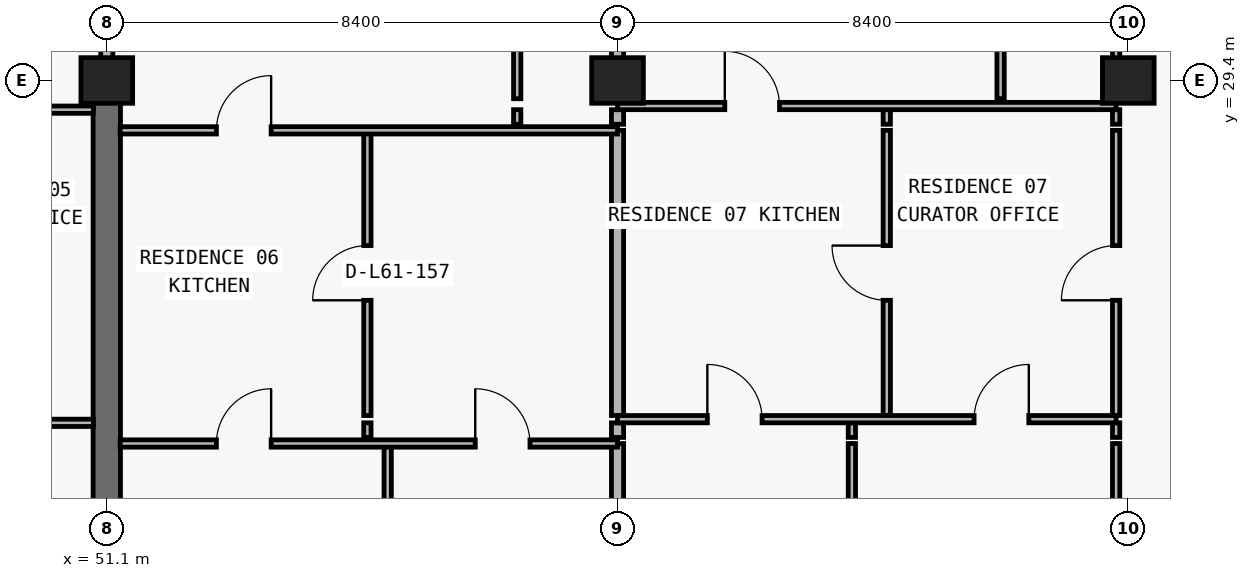
"""IFC4 building model, lengths in metres.
Left out: names, types, materials, properties, quantities, classifications, styles, units other than length and angle.
Written with IfcOpenShell. Run it as: python <this file> out.ifc"""

import sys

from ifc_helpers import new_model, si_unit, direction, frame, frame_2d, origin, origin_2d, place, context, subcontext, project, spatial, rectangle, extrude, element, fill, save


model = new_model("IFC4")
c1 = context("Model", 3, precision=1e-05, world=origin(), true_north=direction((0.0, 1.0)))
c2 = subcontext(c1, "Body", "Model", "MODEL_VIEW")
j1 = project(units=[si_unit("LENGTHUNIT", "METRE"), si_unit("PLANEANGLEUNIT", "RADIAN")], contexts=[c1])
p1 = place(None, origin())
s1 = spatial("IfcSite", under=j1, at=p1, CompositionType="ELEMENT")
p2 = place(p1, origin())
s2 = spatial("IfcBuilding", under=s1, at=p2, CompositionType="ELEMENT")
p3 = place(p2, frame((0.0, 0.0, 218.1)))
s3 = spatial("IfcBuildingStorey", under=s2, at=p3, CompositionType="ELEMENT", Elevation=218.1)
for number, where, z_axis, x_axis in (
    (1, (51.1, 29.4, 0.0), (0.0, 0.0, 1.0), (1.0, 0.0, 0.0)),
    (2, (59.5, 29.4, 0.0), (0.0, 0.0, 1.0), (1.0, 0.0, 0.0)),
    (3, (67.9, 29.4, 0.0), (0.0, 0.0, 1.0), (1.0, 0.0, 0.0)),
):
    element("IfcColumn", number, at=place(p3, frame(where, z_axis=z_axis, x_axis=x_axis)), inside=s3, PredefinedType="COLUMN", context=c2, shape_type="SweptSolid", body=[
        extrude(rectangle(XDim=0.85, YDim=0.75, at=origin_2d()), origin(), (0.0, 0.0, 1.0), 3.0),
    ])
p4 = place(p3, frame((51.1, 20.8, 0.0), z_axis=(0.0, 0.0, 1.0), x_axis=(0.0, 1.0, 0.0)))
e4 = element("IfcWall", 4, at=p4, inside=s3, PredefinedType="SHEAR", context=c2, shape_type="SweptSolid", body=[
    extrude(rectangle(XDim=8.6, YDim=0.45, at=frame_2d((4.3, 0.0))), origin(), (0.0, 0.0, 1.0), 3.0),
])
p5 = place(p3, frame((51.1, 29.405, 0.0), z_axis=(0.0, 0.0, 1.0), x_axis=(0.0, 1.0, 0.0)))
e5 = element("IfcWall", 5, at=p5, inside=s3, PredefinedType="PARTITIONING", context=c2, shape_type="SweptSolid", body=[
    extrude(rectangle(XDim=4.995, YDim=0.2, at=frame_2d((2.498, 0.0))), origin(), (0.0, 0.0, 1.0), 2.285),
])
p6 = place(p3, frame((55.386, 23.53, 0.0), z_axis=(0.0, 0.0, 1.0), x_axis=(0.0, 1.0, 0.0)))
e6 = element("IfcWall", 6, at=p6, inside=s3, PredefinedType="PARTITIONING", context=c2, shape_type="SweptSolid", body=[
    extrude(rectangle(XDim=0.24, YDim=0.12, at=frame_2d((0.12, 0.0))), origin(), (0.0, 0.0, 1.0), 2.449),
])
p7 = place(p3, frame((55.386, 23.89, 0.0), z_axis=(0.0, 0.0, 1.0), x_axis=(0.0, 1.0, 0.0)))
e7 = element("IfcWall", 7, at=p7, inside=s3, PredefinedType="PARTITIONING", context=c2, shape_type="SweptSolid", body=[
    extrude(rectangle(XDim=4.69, YDim=0.12, at=frame_2d((2.345, 0.0))), origin(), (0.0, 0.0, 1.0), 2.449),
])
p8 = place(p7, frame((1.895, 0.0, 0.0)))
e8 = element("IfcOpeningElement", 8, at=p8, cuts=e7, PredefinedType="OPENING", context=c2, shape_type="SweptSolid", body=[
    extrude(rectangle(XDim=0.9, YDim=2.15, at=frame_2d((0.45, 1.075))), frame((0.0, 0.07, 0.0), z_axis=(0.0, -1.0, 0.0), x_axis=(1.0, 0.0, 0.0)), (0.0, 0.0, 1.0), 0.14),
])
p9 = place(p3, frame((55.72, 11.24, 0.0), z_axis=(0.0, 0.0, 1.0), x_axis=(0.0, 1.0, 0.0)))
e9 = element("IfcWall", 9, at=p9, inside=s3, PredefinedType="PARTITIONING", context=c2, shape_type="SweptSolid", body=[
    extrude(rectangle(XDim=12.19, YDim=0.12, at=frame_2d((6.095, 0.0))), origin(), (0.0, 0.0, 1.0), 3.0),
])
p10 = place(p3, frame((57.85, 28.68, 0.0), z_axis=(0.0, 0.0, 1.0), x_axis=(0.0, 1.0, 0.0)))
e10 = element("IfcWall", 10, at=p10, inside=s3, PredefinedType="PARTITIONING", context=c2, shape_type="SweptSolid", body=[
    extrude(rectangle(XDim=0.24, YDim=0.12, at=frame_2d((0.12, 0.0))), origin(), (0.0, 0.0, 1.0), 3.0),
])
p11 = place(p3, frame((57.85, 29.1, 0.0), z_axis=(0.0, 0.0, 1.0), x_axis=(0.0, 1.0, 0.0)))
e11 = element("IfcWall", 11, at=p11, inside=s3, PredefinedType="PARTITIONING", context=c2, shape_type="SweptSolid", body=[
    extrude(rectangle(XDim=5.3, YDim=0.12, at=frame_2d((2.65, 0.0))), origin(), (0.0, 0.0, 1.0), 3.0),
])
p12 = place(p11, frame((2.225, 0.0, 0.0)))
e12 = element("IfcOpeningElement", 12, at=p12, cuts=e11, PredefinedType="OPENING", context=c2, shape_type="SweptSolid", body=[
    extrude(rectangle(XDim=0.85, YDim=2.1, at=frame_2d((0.425, 1.05))), frame((0.0, 0.07, 0.0), z_axis=(0.0, -1.0, 0.0), x_axis=(1.0, 0.0, 0.0)), (0.0, 0.0, 1.0), 0.14),
])
p13 = place(p3, frame((59.5, 11.24, 0.0), z_axis=(0.0, 0.0, 1.0), x_axis=(0.0, 1.0, 0.0)))
e13 = element("IfcWall", 13, at=p13, inside=s3, PredefinedType="PARTITIONING", context=c2, shape_type="SweptSolid", body=[
    extrude(rectangle(XDim=12.19, YDim=0.2, at=frame_2d((6.095, 0.0))), origin(), (0.0, 0.0, 1.0), 2.213),
])
p14 = place(p3, frame((59.5, 23.53, 0.0), z_axis=(0.0, 0.0, 1.0), x_axis=(0.0, 1.0, 0.0)))
e14 = element("IfcWall", 14, at=p14, inside=s3, PredefinedType="PARTITIONING", context=c2, shape_type="SweptSolid", body=[
    extrude(rectangle(XDim=0.24, YDim=0.2, at=frame_2d((0.12, 0.0))), origin(), (0.0, 0.0, 1.0), 2.213),
])
p15 = place(p3, frame((59.5, 23.89, 0.0), z_axis=(0.0, 0.0, 1.0), x_axis=(0.0, 1.0, 0.0)))
e15 = element("IfcWall", 15, at=p15, inside=s3, PredefinedType="PARTITIONING", context=c2, shape_type="SweptSolid", body=[
    extrude(rectangle(XDim=4.69, YDim=0.2, at=frame_2d((2.345, 0.0))), origin(), (0.0, 0.0, 1.0), 2.213),
])
p16 = place(p3, frame((59.5, 28.68, 0.0), z_axis=(0.0, 0.0, 1.0), x_axis=(0.0, 1.0, 0.0)))
e16 = element("IfcWall", 16, at=p16, inside=s3, PredefinedType="PARTITIONING", context=c2, shape_type="SweptSolid", body=[
    extrude(rectangle(XDim=0.24, YDim=0.2, at=frame_2d((0.12, 0.0))), origin(), (0.0, 0.0, 1.0), 2.213),
])
p17 = place(p3, frame((59.5, 29.1, 0.0), z_axis=(0.0, 0.0, 1.0), x_axis=(0.0, 1.0, 0.0)))
e17 = element("IfcWall", 17, at=p17, inside=s3, PredefinedType="PARTITIONING", context=c2, shape_type="SweptSolid", body=[
    extrude(rectangle(XDim=5.3, YDim=0.2, at=frame_2d((2.65, 0.0))), origin(), (0.0, 0.0, 1.0), 2.213),
])
p18 = place(p3, frame((63.354, 11.24, 0.0), z_axis=(0.0, 0.0, 1.0), x_axis=(0.0, 1.0, 0.0)))
e18 = element("IfcWall", 18, at=p18, inside=s3, PredefinedType="PARTITIONING", context=c2, shape_type="SweptSolid", body=[
    extrude(rectangle(XDim=12.19, YDim=0.12, at=frame_2d((6.095, 0.0))), origin(), (0.0, 0.0, 1.0), 3.0),
])
p19 = place(p3, frame((63.354, 23.53, 0.0), z_axis=(0.0, 0.0, 1.0), x_axis=(0.0, 1.0, 0.0)))
e19 = element("IfcWall", 19, at=p19, inside=s3, PredefinedType="PARTITIONING", context=c2, shape_type="SweptSolid", body=[
    extrude(rectangle(XDim=0.24, YDim=0.12, at=frame_2d((0.12, 0.0))), origin(), (0.0, 0.0, 1.0), 3.0),
])
p20 = place(p3, frame((63.928, 23.89, 0.0), z_axis=(0.0, 0.0, 1.0), x_axis=(0.0, 1.0, 0.0)))
e20 = element("IfcWall", 20, at=p20, inside=s3, PredefinedType="PARTITIONING", context=c2, shape_type="SweptSolid", body=[
    extrude(rectangle(XDim=4.69, YDim=0.12, at=frame_2d((2.345, 0.0))), origin(), (0.0, 0.0, 1.0), 2.449),
])
p21 = place(p20, frame((1.895, 0.0, 0.0)))
e21 = element("IfcOpeningElement", 21, at=p21, cuts=e20, PredefinedType="OPENING", context=c2, shape_type="SweptSolid", body=[
    extrude(rectangle(XDim=0.9, YDim=2.15, at=frame_2d((0.45, 1.075))), frame((0.0, 0.07, 0.0), z_axis=(0.0, -1.0, 0.0), x_axis=(1.0, 0.0, 0.0)), (0.0, 0.0, 1.0), 0.14),
])
p22 = place(p3, frame((63.928, 28.68, 0.0), z_axis=(0.0, 0.0, 1.0), x_axis=(0.0, 1.0, 0.0)))
e22 = element("IfcWall", 22, at=p22, inside=s3, PredefinedType="PARTITIONING", context=c2, shape_type="SweptSolid", body=[
    extrude(rectangle(XDim=0.24, YDim=0.12, at=frame_2d((0.12, 0.0))), origin(), (0.0, 0.0, 1.0), 2.449),
])
p23 = place(p3, frame((65.8, 29.1, 0.0), z_axis=(0.0, 0.0, 1.0), x_axis=(0.0, 1.0, 0.0)))
e23 = element("IfcWall", 23, at=p23, inside=s3, PredefinedType="PARTITIONING", context=c2, shape_type="SweptSolid", body=[
    extrude(rectangle(XDim=5.3, YDim=0.12, at=frame_2d((2.65, 0.0))), origin(), (0.0, 0.0, 1.0), 2.675),
])
p24 = place(p23, frame((2.225, 0.0, 0.0)))
e24 = element("IfcOpeningElement", 24, at=p24, cuts=e23, PredefinedType="OPENING", context=c2, shape_type="SweptSolid", body=[
    extrude(rectangle(XDim=0.85, YDim=2.1, at=frame_2d((0.425, 1.05))), frame((0.0, 0.07, 0.0), z_axis=(0.0, -1.0, 0.0), x_axis=(1.0, 0.0, 0.0)), (0.0, 0.0, 1.0), 0.14),
])
p25 = place(p3, frame((67.7, 11.32, 0.0), z_axis=(0.0, 0.0, 1.0), x_axis=(0.0, 1.0, 0.0)))
e25 = element("IfcWall", 25, at=p25, inside=s3, PredefinedType="PARTITIONING", context=c2, shape_type="SweptSolid", body=[
    extrude(rectangle(XDim=12.11, YDim=0.12, at=frame_2d((6.055, 0.0))), origin(), (0.0, 0.0, 1.0), 2.213),
])
p26 = place(p3, frame((67.7, 23.53, 0.0), z_axis=(0.0, 0.0, 1.0), x_axis=(0.0, 1.0, 0.0)))
e26 = element("IfcWall", 26, at=p26, inside=s3, PredefinedType="PARTITIONING", context=c2, shape_type="SweptSolid", body=[
    extrude(rectangle(XDim=0.24, YDim=0.12, at=frame_2d((0.12, 0.0))), origin(), (0.0, 0.0, 1.0), 2.213),
])
p27 = place(p3, frame((67.7, 23.89, 0.0), z_axis=(0.0, 0.0, 1.0), x_axis=(0.0, 1.0, 0.0)))
e27 = element("IfcWall", 27, at=p27, inside=s3, PredefinedType="PARTITIONING", context=c2, shape_type="SweptSolid", body=[
    extrude(rectangle(XDim=4.69, YDim=0.12, at=frame_2d((2.345, 0.0))), origin(), (0.0, 0.0, 1.0), 2.213),
])
p28 = place(p27, frame((1.895, 0.0, 0.0)))
e28 = element("IfcOpeningElement", 28, at=p28, cuts=e27, PredefinedType="OPENING", context=c2, shape_type="SweptSolid", body=[
    extrude(rectangle(XDim=0.9, YDim=2.15, at=frame_2d((0.45, 1.075))), frame((0.0, 0.07, 0.0), z_axis=(0.0, -1.0, 0.0), x_axis=(1.0, 0.0, 0.0)), (0.0, 0.0, 1.0), 0.14),
])
p29 = place(p3, frame((67.7, 28.68, 0.0), z_axis=(0.0, 0.0, 1.0), x_axis=(0.0, 1.0, 0.0)))
e29 = element("IfcWall", 29, at=p29, inside=s3, PredefinedType="PARTITIONING", context=c2, shape_type="SweptSolid", body=[
    extrude(rectangle(XDim=0.24, YDim=0.12, at=frame_2d((0.12, 0.0))), origin(), (0.0, 0.0, 1.0), 2.213),
])
p30 = place(p3, frame((67.7, 29.1, 0.0), z_axis=(0.0, 0.0, 1.0), x_axis=(0.0, 1.0, 0.0)))
e30 = element("IfcWall", 30, at=p30, inside=s3, PredefinedType="PARTITIONING", context=c2, shape_type="SweptSolid", body=[
    extrude(rectangle(XDim=5.3, YDim=0.12, at=frame_2d((2.65, 0.0))), origin(), (0.0, 0.0, 1.0), 2.213),
])
p31 = place(p3, frame((51.32, 23.43, 0.0), z_axis=(0.0, 0.0, 1.0), x_axis=(1.0, 0.0, 0.0)))
e31 = element("IfcWall", 31, at=p31, inside=s3, PredefinedType="PARTITIONING", context=c2, shape_type="SweptSolid", body=[
    extrude(rectangle(XDim=8.18, YDim=0.12, at=frame_2d((4.09, 0.0))), origin(), (0.0, 0.0, 1.0), 3.0),
])
p32 = place(p31, frame((1.583, 0.0, 0.0)))
e32 = element("IfcOpeningElement", 32, at=p32, cuts=e31, PredefinedType="OPENING", context=c2, shape_type="SweptSolid", body=[
    extrude(rectangle(XDim=0.9, YDim=2.15, at=frame_2d((0.45, 1.075))), frame((0.0, 0.07, 0.0), z_axis=(0.0, -1.0, 0.0), x_axis=(1.0, 0.0, 0.0)), (0.0, 0.0, 1.0), 0.14),
])
p33 = place(p31, frame((5.84, 0.0, 0.0)))
e33 = element("IfcOpeningElement", 33, at=p33, cuts=e31, PredefinedType="OPENING", context=c2, shape_type="SweptSolid", body=[
    extrude(rectangle(XDim=0.9, YDim=2.15, at=frame_2d((0.45, 1.075))), frame((0.0, 0.07, 0.0), z_axis=(0.0, -1.0, 0.0), x_axis=(1.0, 0.0, 0.0)), (0.0, 0.0, 1.0), 0.14),
])
p34 = place(p3, frame((42.7, 23.77, 0.0), z_axis=(0.0, 0.0, 1.0), x_axis=(1.0, 0.0, 0.0)))
e34 = element("IfcWall", 34, at=p34, inside=s3, PredefinedType="PARTITIONING", context=c2, shape_type="SweptSolid", body=[
    extrude(rectangle(XDim=8.18, YDim=0.12, at=frame_2d((4.09, 0.0))), origin(), (0.0, 0.0, 1.0), 3.0),
])
p35 = place(p34, frame((1.524, 0.0, 0.0)))
e35 = element("IfcOpeningElement", 35, at=p35, cuts=e34, PredefinedType="OPENING", context=c2, shape_type="SweptSolid", body=[
    extrude(rectangle(XDim=0.9, YDim=2.15, at=frame_2d((0.45, 1.075))), frame((0.0, 0.07, 0.0), z_axis=(0.0, -1.0, 0.0), x_axis=(1.0, 0.0, 0.0)), (0.0, 0.0, 1.0), 0.14),
])
p36 = place(p34, frame((6.033, 0.0, 0.0)))
e36 = element("IfcOpeningElement", 36, at=p36, cuts=e34, PredefinedType="OPENING", context=c2, shape_type="SweptSolid", body=[
    extrude(rectangle(XDim=0.9, YDim=2.15, at=frame_2d((0.45, 1.075))), frame((0.0, 0.07, 0.0), z_axis=(0.0, -1.0, 0.0), x_axis=(1.0, 0.0, 0.0)), (0.0, 0.0, 1.0), 0.14),
])
p37 = place(p3, frame((59.5, 23.83, 0.0), z_axis=(0.0, 0.0, 1.0), x_axis=(1.0, 0.0, 0.0)))
e37 = element("IfcWall", 37, at=p37, inside=s3, PredefinedType="PARTITIONING", context=c2, shape_type="SweptSolid", body=[
    extrude(rectangle(XDim=8.2, YDim=0.12, at=frame_2d((4.1, 0.0))), origin(), (0.0, 0.0, 1.0), 3.0),
])
p38 = place(p37, frame((1.477, 0.0, 0.0)))
e38 = element("IfcOpeningElement", 38, at=p38, cuts=e37, PredefinedType="OPENING", context=c2, shape_type="SweptSolid", body=[
    extrude(rectangle(XDim=0.9, YDim=2.15, at=frame_2d((0.45, 1.075))), frame((0.0, 0.07, 0.0), z_axis=(0.0, -1.0, 0.0), x_axis=(1.0, 0.0, 0.0)), (0.0, 0.0, 1.0), 0.14),
])
p39 = place(p37, frame((5.864, 0.0, 0.0)))
e39 = element("IfcOpeningElement", 39, at=p39, cuts=e37, PredefinedType="OPENING", context=c2, shape_type="SweptSolid", body=[
    extrude(rectangle(XDim=0.9, YDim=2.15, at=frame_2d((0.45, 1.075))), frame((0.0, 0.07, 0.0), z_axis=(0.0, -1.0, 0.0), x_axis=(1.0, 0.0, 0.0)), (0.0, 0.0, 1.0), 0.14),
])
p40 = place(p3, frame((51.32, 28.58, 0.0), z_axis=(0.0, 0.0, 1.0), x_axis=(1.0, 0.0, 0.0)))
e40 = element("IfcWall", 40, at=p40, inside=s3, PredefinedType="PARTITIONING", context=c2, shape_type="SweptSolid", body=[
    extrude(rectangle(XDim=8.18, YDim=0.12, at=frame_2d((4.09, 0.0))), origin(), (0.0, 0.0, 1.0), 3.0),
])
p41 = place(p40, frame((1.583, 0.0, 0.0)))
e41 = element("IfcOpeningElement", 41, at=p41, cuts=e40, PredefinedType="OPENING", context=c2, shape_type="SweptSolid", body=[
    extrude(rectangle(XDim=0.9, YDim=2.15, at=frame_2d((0.45, 1.075))), frame((0.0, 0.07, 0.0), z_axis=(0.0, -1.0, 0.0), x_axis=(1.0, 0.0, 0.0)), (0.0, 0.0, 1.0), 0.14),
])
p42 = place(p3, frame((42.7, 28.92, 0.0), z_axis=(0.0, 0.0, 1.0), x_axis=(1.0, 0.0, 0.0)))
e42 = element("IfcWall", 42, at=p42, inside=s3, PredefinedType="PARTITIONING", context=c2, shape_type="SweptSolid", body=[
    extrude(rectangle(XDim=8.18, YDim=0.12, at=frame_2d((4.09, 0.0))), origin(), (0.0, 0.0, 1.0), 3.0),
])
p43 = place(p42, frame((1.943, 0.0, 0.0)))
e43 = element("IfcOpeningElement", 43, at=p43, cuts=e42, PredefinedType="OPENING", context=c2, shape_type="SweptSolid", body=[
    extrude(rectangle(XDim=0.9, YDim=2.15, at=frame_2d((0.45, 1.075))), frame((0.0, 0.07, 0.0), z_axis=(0.0, -1.0, 0.0), x_axis=(1.0, 0.0, 0.0)), (0.0, 0.0, 1.0), 0.14),
])
p44 = place(p3, frame((59.5, 28.98, 0.0), z_axis=(0.0, 0.0, 1.0), x_axis=(1.0, 0.0, 0.0)))
e44 = element("IfcWall", 44, at=p44, inside=s3, PredefinedType="PARTITIONING", context=c2, shape_type="SweptSolid", body=[
    extrude(rectangle(XDim=8.2, YDim=0.12, at=frame_2d((4.1, 0.0))), origin(), (0.0, 0.0, 1.0), 3.0),
])
p45 = place(p44, frame((1.764, 0.0, 0.0)))
e45 = element("IfcOpeningElement", 45, at=p45, cuts=e44, PredefinedType="OPENING", context=c2, shape_type="SweptSolid", body=[
    extrude(rectangle(XDim=0.9, YDim=2.15, at=frame_2d((0.45, 1.075))), frame((0.0, 0.07, 0.0), z_axis=(0.0, -1.0, 0.0), x_axis=(1.0, 0.0, 0.0)), (0.0, 0.0, 1.0), 0.14),
])
p46 = place(p41, origin())
e46 = element("IfcDoor", 46, at=p46, inside=s3, OperationType="SINGLE_SWING_RIGHT", PredefinedType="DOOR", context=c2, shape_type="SweptSolid", body=[
    extrude(rectangle(XDim=0.9, YDim=2.15, at=frame_2d((0.45, 1.075))), frame((0.0, 0.025, 0.0), z_axis=(0.0, -1.0, 0.0), x_axis=(1.0, 0.0, 0.0)), (0.0, 0.0, 1.0), 0.05),
])
fill(e41, e46)
p47 = place(p8, origin())
e47 = element("IfcDoor", 47, at=p47, inside=s3, OperationType="SINGLE_SWING_LEFT", PredefinedType="DOOR", context=c2, shape_type="SweptSolid", body=[
    extrude(rectangle(XDim=0.9, YDim=2.15, at=frame_2d((0.45, 1.075))), frame((0.0, 0.025, 0.0), z_axis=(0.0, -1.0, 0.0), x_axis=(1.0, 0.0, 0.0)), (0.0, 0.0, 1.0), 0.05),
])
fill(e8, e47)
p48 = place(p32, origin())
e48 = element("IfcDoor", 48, at=p48, inside=s3, OperationType="SINGLE_SWING_RIGHT", PredefinedType="DOOR", context=c2, shape_type="SweptSolid", body=[
    extrude(rectangle(XDim=0.9, YDim=2.15, at=frame_2d((0.45, 1.075))), frame((0.0, 0.025, 0.0), z_axis=(0.0, -1.0, 0.0), x_axis=(1.0, 0.0, 0.0)), (0.0, 0.0, 1.0), 0.05),
])
fill(e32, e48)
p49 = place(p33, origin())
e49 = element("IfcDoor", 49, at=p49, inside=s3, OperationType="SINGLE_SWING_LEFT", PredefinedType="DOOR", context=c2, shape_type="SweptSolid", body=[
    extrude(rectangle(XDim=0.9, YDim=2.15, at=frame_2d((0.45, 1.075))), frame((0.0, 0.025, 0.0), z_axis=(0.0, -1.0, 0.0), x_axis=(1.0, 0.0, 0.0)), (0.0, 0.0, 1.0), 0.05),
])
fill(e33, e49)
p50 = place(p45, origin())
e50 = element("IfcDoor", 50, at=p50, inside=s3, OperationType="SINGLE_SWING_LEFT", PredefinedType="DOOR", context=c2, shape_type="SweptSolid", body=[
    extrude(rectangle(XDim=0.9, YDim=2.15, at=frame_2d((0.45, 1.075))), frame((0.0, 0.025, 0.0), z_axis=(0.0, -1.0, 0.0), x_axis=(1.0, 0.0, 0.0)), (0.0, 0.0, 1.0), 0.05),
])
fill(e45, e50)
p51 = place(p21, origin())
e51 = element("IfcDoor", 51, at=p51, inside=s3, OperationType="SINGLE_SWING_RIGHT", PredefinedType="DOOR", context=c2, shape_type="SweptSolid", body=[
    extrude(rectangle(XDim=0.9, YDim=2.15, at=frame_2d((0.45, 1.075))), frame((0.0, 0.025, 0.0), z_axis=(0.0, -1.0, 0.0), x_axis=(1.0, 0.0, 0.0)), (0.0, 0.0, 1.0), 0.05),
])
fill(e21, e51)
p52 = place(p38, origin())
e52 = element("IfcDoor", 52, at=p52, inside=s3, OperationType="SINGLE_SWING_LEFT", PredefinedType="DOOR", context=c2, shape_type="SweptSolid", body=[
    extrude(rectangle(XDim=0.9, YDim=2.15, at=frame_2d((0.45, 1.075))), frame((0.0, 0.025, 0.0), z_axis=(0.0, -1.0, 0.0), x_axis=(1.0, 0.0, 0.0)), (0.0, 0.0, 1.0), 0.05),
])
fill(e38, e52)
p53 = place(p39, origin())
e53 = element("IfcDoor", 53, at=p53, inside=s3, OperationType="SINGLE_SWING_RIGHT", PredefinedType="DOOR", context=c2, shape_type="SweptSolid", body=[
    extrude(rectangle(XDim=0.9, YDim=2.15, at=frame_2d((0.45, 1.075))), frame((0.0, 0.025, 0.0), z_axis=(0.0, -1.0, 0.0), x_axis=(1.0, 0.0, 0.0)), (0.0, 0.0, 1.0), 0.05),
])
fill(e39, e53)
p54 = place(p28, origin())
e54 = element("IfcDoor", 54, at=p54, inside=s3, OperationType="SINGLE_SWING_LEFT", PredefinedType="DOOR", context=c2, shape_type="SweptSolid", body=[
    extrude(rectangle(XDim=0.9, YDim=2.15, at=frame_2d((0.45, 1.075))), frame((0.0, 0.025, 0.0), z_axis=(0.0, -1.0, 0.0), x_axis=(1.0, 0.0, 0.0)), (0.0, 0.0, 1.0), 0.05),
])
fill(e28, e54)
save(model, sys.argv[1])
